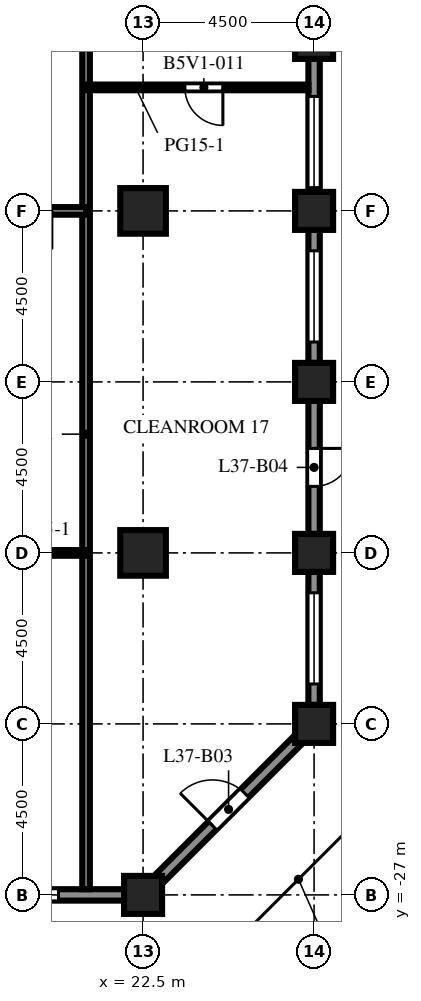
"""IFC4 building model, lengths in metres.
Left out: names, types, materials, properties, quantities, classifications, styles, units other than length and angle.
Written with IfcOpenShell. Run it as: python <this file> out.ifc"""

import sys

from ifc_helpers import new_model, si_unit, direction, frame, frame_2d, origin, origin_2d, place, context, subcontext, project, spatial, rectangle, extrude, element, fill, save


model = new_model("IFC4")
c1 = context("Model", 3, precision=1e-05, world=origin(), true_north=direction((0.0, 1.0)))
c2 = subcontext(c1, "Body", "Model", "MODEL_VIEW")
j1 = project(units=[si_unit("LENGTHUNIT", "METRE"), si_unit("PLANEANGLEUNIT", "RADIAN")], contexts=[c1])
p1 = place(None, origin())
s1 = spatial("IfcSite", under=j1, at=p1, CompositionType="ELEMENT")
p2 = place(p1, origin())
s2 = spatial("IfcBuilding", under=s1, at=p2, CompositionType="ELEMENT")
p3 = place(p2, frame((0.0, 0.0, 165.0)))
s3 = spatial("IfcBuildingStorey", under=s2, at=p3, CompositionType="ELEMENT", Elevation=165.0)
for number, where, z_axis, x_axis in (
    (1, (22.5, -27.0, 0.0), (0.0, 0.0, 1.0), (1.0, 0.0, 0.0)),
    (2, (27.0, -22.5, 0.0), (0.0, 0.0, 1.0), (1.0, 0.0, 0.0)),
    (3, (27.0, -18.0, 0.0), (0.0, 0.0, 1.0), (1.0, 0.0, 0.0)),
    (4, (27.0, -13.5, 0.0), (0.0, 0.0, 1.0), (1.0, 0.0, 0.0)),
    (5, (27.0, -9.0, 0.0), (0.0, 0.0, 1.0), (1.0, 0.0, 0.0)),
    (6, (27.0, -4.5, 0.0), (0.0, 0.0, 1.0), (1.0, 0.0, 0.0)),
):
    element("IfcColumn", number, at=place(p3, frame(where, z_axis=z_axis, x_axis=x_axis)), inside=s3, PredefinedType="COLUMN", context=c2, shape_type="SweptSolid", body=[
        extrude(rectangle(XDim=1.0, YDim=1.0, at=origin_2d()), origin(), (0.0, 0.0, 1.0), 4.1),
    ])
for number, where, z_axis, x_axis in (
    (7, (22.5, -18.0, 0.0), (0.0, 0.0, 1.0), (1.0, 0.0, 0.0)),
    (8, (22.5, -9.0, 0.0), (0.0, 0.0, 1.0), (1.0, 0.0, 0.0)),
):
    element("IfcColumn", number, at=place(p3, frame(where, z_axis=z_axis, x_axis=x_axis)), inside=s3, PredefinedType="COLUMN", context=c2, shape_type="SweptSolid", body=[
        extrude(rectangle(XDim=1.2, YDim=1.2, at=origin_2d()), origin(), (0.0, 0.0, 1.0), 4.1),
    ])
p4 = place(p3, frame((22.0, -27.0, 0.0), z_axis=(0.0, 0.0, 1.0), x_axis=(-1.0, 0.0, 0.0)))
e9 = element("IfcWall", 9, at=p4, inside=s3, PredefinedType="SOLIDWALL", context=c2, shape_type="SweptSolid", body=[
    extrude(rectangle(XDim=3.5, YDim=0.3, at=frame_2d((1.75, 0.0))), origin(), (0.0, 0.0, 1.0), 2.85),
])
p5 = place(p4, frame((1.725, 0.0, 0.8)))
e10 = element("IfcOpeningElement", 10, at=p5, cuts=e9, PredefinedType="OPENING", context=c2, shape_type="SweptSolid", body=[
    extrude(rectangle(XDim=1.2, YDim=1.7, at=frame_2d((0.6, 0.85))), frame((0.0, 0.16, 0.0), z_axis=(0.0, -1.0, 0.0), x_axis=(1.0, 0.0, 0.0)), (0.0, 0.0, 1.0), 0.32),
])
p6 = place(p3, frame((26.606, -22.894, 0.0), z_axis=(0.0, 0.0, 1.0), x_axis=(-0.707106781187, -0.707106781187, 0.0)))
e11 = element("IfcWall", 11, at=p6, inside=s3, PredefinedType="SOLIDWALL", context=c2, shape_type="SweptSolid", body=[
    extrude(rectangle(XDim=5.25, YDim=0.3, at=frame_2d((2.625, 0.0))), origin(), (0.0, 0.0, 1.0), 2.85),
])
p7 = place(p6, frame((2.025, 0.0, 0.0)))
e12 = element("IfcOpeningElement", 12, at=p7, cuts=e11, PredefinedType="OPENING", context=c2, shape_type="SweptSolid", body=[
    extrude(rectangle(XDim=1.2, YDim=2.2, at=frame_2d((0.6, 1.1))), frame((0.0, 0.16, 0.0), z_axis=(0.0, -1.0, 0.0), x_axis=(1.0, 0.0, 0.0)), (0.0, 0.0, 1.0), 0.32),
])
p8 = place(p3, frame((27.0, -18.5, 0.0), z_axis=(0.0, 0.0, 1.0), x_axis=(0.0, -1.0, 0.0)))
e13 = element("IfcWall", 13, at=p8, inside=s3, PredefinedType="SOLIDWALL", context=c2, shape_type="SweptSolid", body=[
    extrude(rectangle(XDim=3.5, YDim=0.3, at=frame_2d((1.75, 0.0))), origin(), (0.0, 0.0, 1.0), 2.85),
])
p9 = place(p8, frame((0.55, 0.0, 0.8)))
e14 = element("IfcOpeningElement", 14, at=p9, cuts=e13, PredefinedType="OPENING", context=c2, shape_type="SweptSolid", body=[
    extrude(rectangle(XDim=2.4, YDim=1.7, at=frame_2d((1.2, 0.85))), frame((0.0, 0.16, 0.0), z_axis=(0.0, -1.0, 0.0), x_axis=(1.0, 0.0, 0.0)), (0.0, 0.0, 1.0), 0.32),
])
p10 = place(p3, frame((27.0, -14.0, 0.0), z_axis=(0.0, 0.0, 1.0), x_axis=(0.0, -1.0, 0.0)))
e15 = element("IfcWall", 15, at=p10, inside=s3, PredefinedType="SOLIDWALL", context=c2, shape_type="SweptSolid", body=[
    extrude(rectangle(XDim=3.5, YDim=0.3, at=frame_2d((1.75, 0.0))), origin(), (0.0, 0.0, 1.0), 2.85),
])
p11 = place(p10, frame((1.25, 0.0, 0.0)))
e16 = element("IfcOpeningElement", 16, at=p11, cuts=e15, PredefinedType="OPENING", context=c2, shape_type="SweptSolid", body=[
    extrude(rectangle(XDim=1.0, YDim=2.2, at=frame_2d((0.5, 1.1))), frame((0.0, 0.16, 0.0), z_axis=(0.0, -1.0, 0.0), x_axis=(1.0, 0.0, 0.0)), (0.0, 0.0, 1.0), 0.32),
])
p12 = place(p3, frame((27.0, -9.5, 0.0), z_axis=(0.0, 0.0, 1.0), x_axis=(0.0, -1.0, 0.0)))
e17 = element("IfcWall", 17, at=p12, inside=s3, PredefinedType="SOLIDWALL", context=c2, shape_type="SweptSolid", body=[
    extrude(rectangle(XDim=3.5, YDim=0.3, at=frame_2d((1.75, 0.0))), origin(), (0.0, 0.0, 1.0), 2.85),
])
p13 = place(p12, frame((0.55, 0.0, 0.8)))
e18 = element("IfcOpeningElement", 18, at=p13, cuts=e17, PredefinedType="OPENING", context=c2, shape_type="SweptSolid", body=[
    extrude(rectangle(XDim=2.4, YDim=1.7, at=frame_2d((1.2, 0.85))), frame((0.0, 0.16, 0.0), z_axis=(0.0, -1.0, 0.0), x_axis=(1.0, 0.0, 0.0)), (0.0, 0.0, 1.0), 0.32),
])
p14 = place(p3, frame((27.0, -5.0, 0.0), z_axis=(0.0, 0.0, 1.0), x_axis=(0.0, -1.0, 0.0)))
e19 = element("IfcWall", 19, at=p14, inside=s3, PredefinedType="SOLIDWALL", context=c2, shape_type="SweptSolid", body=[
    extrude(rectangle(XDim=3.5, YDim=0.3, at=frame_2d((1.75, 0.0))), origin(), (0.0, 0.0, 1.0), 2.85),
])
p15 = place(p14, frame((0.988, 0.0, 0.8)))
e20 = element("IfcOpeningElement", 20, at=p15, cuts=e19, PredefinedType="OPENING", context=c2, shape_type="SweptSolid", body=[
    extrude(rectangle(XDim=2.4, YDim=1.7, at=frame_2d((1.2, 0.85))), frame((0.0, 0.16, 0.0), z_axis=(0.0, -1.0, 0.0), x_axis=(1.0, 0.0, 0.0)), (0.0, 0.0, 1.0), 0.32),
])
p16 = place(p3, frame((21.0, 3.25, 0.0), z_axis=(0.0, 0.0, 1.0), x_axis=(0.0, -1.0, 0.0)))
e21 = element("IfcWall", 21, at=p16, inside=s3, PredefinedType="PARTITIONING", context=c2, shape_type="SweptSolid", body=[
    extrude(rectangle(XDim=30.1, YDim=0.2, at=frame_2d((15.05, 0.0))), origin(), (0.0, 0.0, 1.0), 3.65),
])
p17 = place(p16, frame((5.15, 0.0, 0.0)))
e22 = element("IfcOpeningElement", 22, at=p17, cuts=e21, PredefinedType="OPENING", context=c2, shape_type="SweptSolid", body=[
    extrude(rectangle(XDim=1.0, YDim=2.1, at=frame_2d((0.5, 1.05))), frame((0.0, 0.11, 0.0), z_axis=(0.0, -1.0, 0.0), x_axis=(1.0, 0.0, 0.0)), (0.0, 0.0, 1.0), 0.22),
])
p18 = place(p3, frame((18.6, -18.0, 0.0), z_axis=(0.0, 0.0, 1.0), x_axis=(1.0, 0.0, 0.0)))
e23 = element("IfcWall", 23, at=p18, inside=s3, PredefinedType="PARTITIONING", context=c2, shape_type="SweptSolid", body=[
    extrude(rectangle(XDim=2.4, YDim=0.15, at=frame_2d((1.2, 0.0))), origin(), (0.0, 0.0, 1.0), 3.65),
])
p19 = place(p3, frame((21.0, -9.0, 0.0), z_axis=(0.0, 0.0, 1.0), x_axis=(-1.0, 0.0, 0.0)))
e24 = element("IfcWall", 24, at=p19, inside=s3, PredefinedType="PARTITIONING", context=c2, shape_type="SweptSolid", body=[
    extrude(rectangle(XDim=3.0, YDim=0.2, at=frame_2d((1.5, 0.0))), origin(), (0.0, 0.0, 1.0), 3.65),
])
p20 = place(p19, frame((0.9, 0.0, 0.0)))
e25 = element("IfcOpeningElement", 25, at=p20, cuts=e24, PredefinedType="OPENING", context=c2, shape_type="SweptSolid", body=[
    extrude(rectangle(XDim=1.0, YDim=2.1, at=frame_2d((0.5, 1.05))), frame((0.0, 0.11, 0.0), z_axis=(0.0, -1.0, 0.0), x_axis=(1.0, 0.0, 0.0)), (0.0, 0.0, 1.0), 0.22),
])
p21 = place(p3, frame((26.85, -5.75, 0.0), z_axis=(0.0, 0.0, 1.0), x_axis=(-1.0, 0.0, 0.0)))
e26 = element("IfcWall", 26, at=p21, inside=s3, PredefinedType="PARTITIONING", context=c2, shape_type="SweptSolid", body=[
    extrude(rectangle(XDim=5.85, YDim=0.15, at=frame_2d((2.925, 0.0))), origin(), (0.0, 0.0, 1.0), 3.65),
])
p22 = place(p21, frame((2.25, 0.0, 0.0)))
e27 = element("IfcOpeningElement", 27, at=p22, cuts=e26, PredefinedType="OPENING", context=c2, shape_type="SweptSolid", body=[
    extrude(rectangle(XDim=1.0, YDim=2.1, at=frame_2d((0.5, 1.05))), frame((0.0, 0.085, 0.0), z_axis=(0.0, -1.0, 0.0), x_axis=(1.0, 0.0, 0.0)), (0.0, 0.0, 1.0), 0.17),
])
p23 = place(p5, origin())
e28 = element("IfcWindow", 28, at=p23, inside=s3, PartitioningType="SINGLE_PANEL", PredefinedType="WINDOW", context=c2, shape_type="SweptSolid", body=[
    extrude(rectangle(XDim=1.2, YDim=1.7, at=frame_2d((0.6, 0.85))), frame((0.0, 0.03, 0.0), z_axis=(0.0, -1.0, 0.0), x_axis=(1.0, 0.0, 0.0)), (0.0, 0.0, 1.0), 0.06),
])
fill(e10, e28)
p24 = place(p7, origin())
e29 = element("IfcDoor", 29, at=p24, inside=s3, OperationType="SINGLE_SWING_RIGHT", PredefinedType="DOOR", context=c2, shape_type="SweptSolid", body=[
    extrude(rectangle(XDim=1.2, YDim=2.2, at=frame_2d((0.6, 1.1))), frame((0.0, 0.025, 0.0), z_axis=(0.0, -1.0, 0.0), x_axis=(1.0, 0.0, 0.0)), (0.0, 0.0, 1.0), 0.05),
])
fill(e12, e29)
p25 = place(p9, origin())
e30 = element("IfcWindow", 30, at=p25, inside=s3, PartitioningType="SINGLE_PANEL", PredefinedType="WINDOW", context=c2, shape_type="SweptSolid", body=[
    extrude(rectangle(XDim=2.4, YDim=1.7, at=frame_2d((1.2, 0.85))), frame((0.0, 0.03, 0.0), z_axis=(0.0, -1.0, 0.0), x_axis=(1.0, 0.0, 0.0)), (0.0, 0.0, 1.0), 0.06),
])
fill(e14, e30)
p26 = place(p11, origin())
e31 = element("IfcDoor", 31, at=p26, inside=s3, OperationType="SINGLE_SWING_LEFT", PredefinedType="DOOR", context=c2, shape_type="SweptSolid", body=[
    extrude(rectangle(XDim=1.0, YDim=2.2, at=frame_2d((0.5, 1.1))), frame((0.0, 0.025, 0.0), z_axis=(0.0, -1.0, 0.0), x_axis=(1.0, 0.0, 0.0)), (0.0, 0.0, 1.0), 0.05),
])
fill(e16, e31)
p27 = place(p13, origin())
e32 = element("IfcWindow", 32, at=p27, inside=s3, PartitioningType="SINGLE_PANEL", PredefinedType="WINDOW", context=c2, shape_type="SweptSolid", body=[
    extrude(rectangle(XDim=2.4, YDim=1.7, at=frame_2d((1.2, 0.85))), frame((0.0, 0.03, 0.0), z_axis=(0.0, -1.0, 0.0), x_axis=(1.0, 0.0, 0.0)), (0.0, 0.0, 1.0), 0.06),
])
fill(e18, e32)
p28 = place(p15, origin())
e33 = element("IfcWindow", 33, at=p28, inside=s3, PartitioningType="SINGLE_PANEL", PredefinedType="WINDOW", context=c2, shape_type="SweptSolid", body=[
    extrude(rectangle(XDim=2.4, YDim=1.7, at=frame_2d((1.2, 0.85))), frame((0.0, 0.03, 0.0), z_axis=(0.0, -1.0, 0.0), x_axis=(1.0, 0.0, 0.0)), (0.0, 0.0, 1.0), 0.06),
])
fill(e20, e33)
p29 = place(p22, origin())
e34 = element("IfcDoor", 34, at=p29, inside=s3, OperationType="SINGLE_SWING_LEFT", PredefinedType="DOOR", context=c2, shape_type="SweptSolid", body=[
    extrude(rectangle(XDim=1.0, YDim=2.1, at=frame_2d((0.5, 1.05))), frame((0.0, 0.025, 0.0), z_axis=(0.0, -1.0, 0.0), x_axis=(1.0, 0.0, 0.0)), (0.0, 0.0, 1.0), 0.05),
])
fill(e27, e34)
save(model, sys.argv[1])
